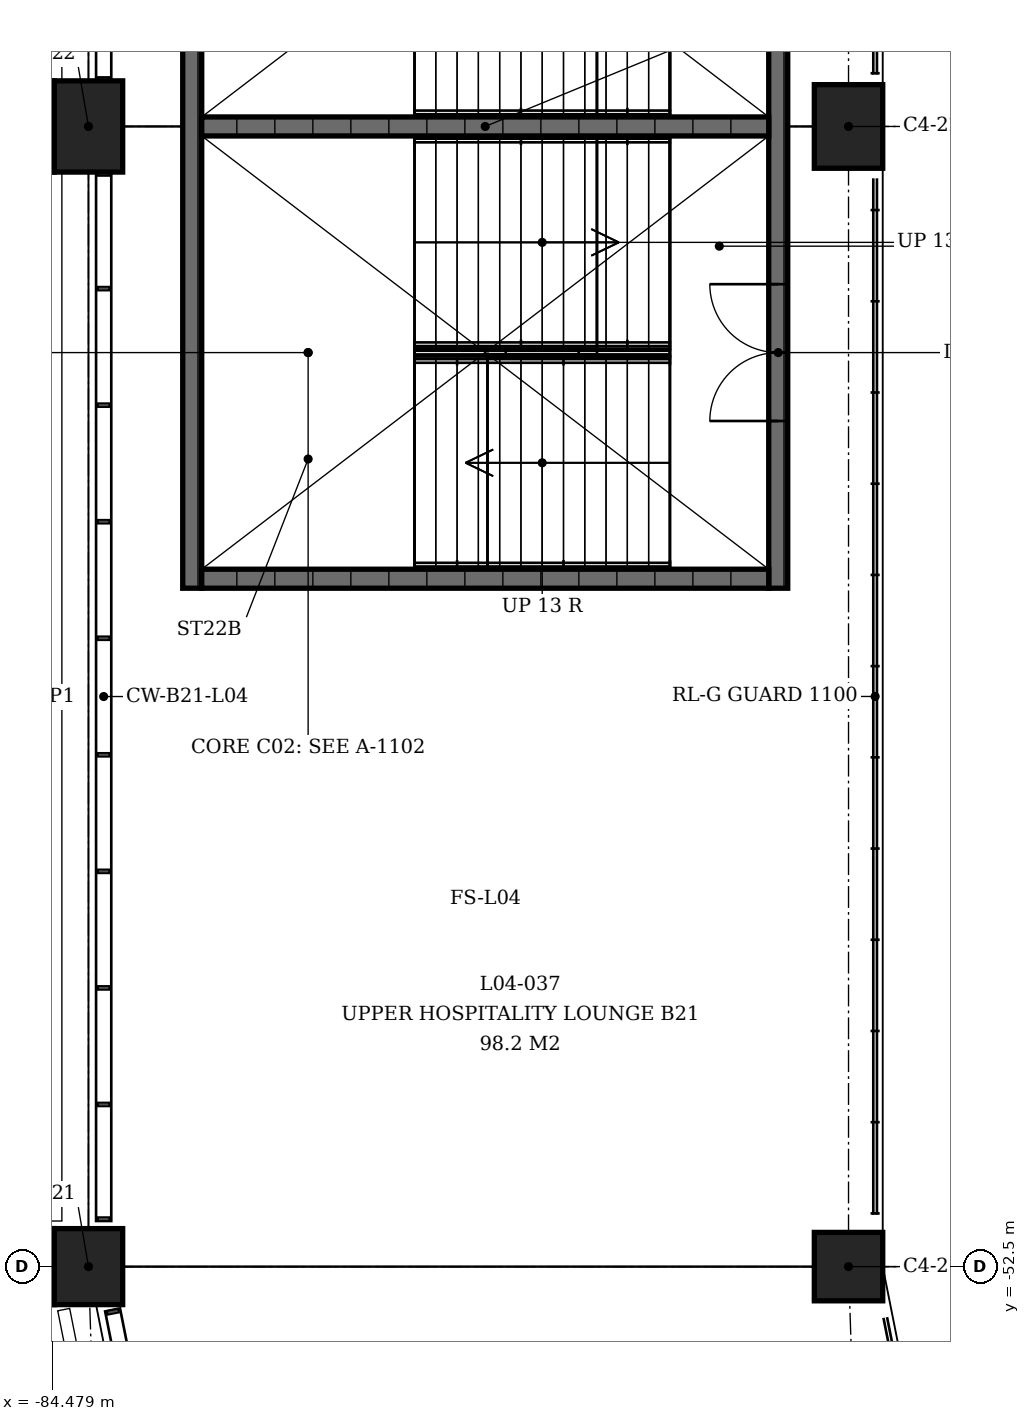
"""IFC4 building model, lengths in metres.
Left out: names, types, materials, properties, quantities, classifications, styles, units other than length and angle.
Written with IfcOpenShell. Run it as: python <this file> out.ifc"""

import sys

from ifc_helpers import new_model, si_unit, direction, frame, frame_2d, origin, origin_2d, place, context, subcontext, project, spatial, rectangle, extrude, element, fill, save


model = new_model("IFC4")
c1 = context("Model", 3, precision=1e-05, world=origin(), true_north=direction((0.0, 1.0)))
c2 = subcontext(c1, "Body", "Model", "MODEL_VIEW")
j1 = project(units=[si_unit("LENGTHUNIT", "METRE"), si_unit("PLANEANGLEUNIT", "RADIAN")], contexts=[c1])
p1 = place(None, origin())
s1 = spatial("IfcSite", under=j1, at=p1, CompositionType="ELEMENT")
p2 = place(p1, origin())
s2 = spatial("IfcBuilding", under=s1, at=p2, CompositionType="ELEMENT")
p3 = place(p2, frame((0.0, 0.0, 18.0)))
s3 = spatial("IfcBuildingStorey", under=s2, at=p3, CompositionType="ELEMENT", Elevation=18.0)
p4 = place(p3, frame((-74.0, -52.5, 0.0), z_axis=(0.0, 0.0, 1.0), x_axis=(0.0, -1.0, 0.0)))
e1 = element("IfcColumn", 1, at=p4, inside=s3, PredefinedType="COLUMN", context=c2, shape_type="SweptSolid", body=[
    extrude(rectangle(XDim=0.9, YDim=0.9, at=origin_2d()), origin(), (0.0, 0.0, 1.0), 4.5),
])
p5 = place(p3, frame((-84.0, -52.5, 0.0), z_axis=(0.0, 0.0, 1.0), x_axis=(0.0, -1.0, 0.0)))
e2 = element("IfcColumn", 2, at=p5, inside=s3, PredefinedType="COLUMN", context=c2, shape_type="SweptSolid", body=[
    extrude(rectangle(XDim=1.0, YDim=0.9, at=origin_2d()), origin(), (0.0, 0.0, 1.0), 4.5),
])
p6 = place(p3, frame((-74.0, -37.5, 0.0), z_axis=(0.0, 0.0, 1.0), x_axis=(0.0, -1.0, 0.0)))
e3 = element("IfcColumn", 3, at=p6, inside=s3, PredefinedType="COLUMN", context=c2, shape_type="SweptSolid", body=[
    extrude(rectangle(XDim=1.1, YDim=0.9, at=origin_2d()), origin(), (0.0, 0.0, 1.0), 4.5),
])
p7 = place(p3, frame((-84.0, -37.5, 0.0), z_axis=(0.0, 0.0, 1.0), x_axis=(0.0, -1.0, 0.0)))
e4 = element("IfcColumn", 4, at=p7, inside=s3, PredefinedType="COLUMN", context=c2, shape_type="SweptSolid", body=[
    extrude(rectangle(XDim=1.2, YDim=0.9, at=origin_2d()), origin(), (0.0, 0.0, 1.0), 4.5),
])
p8 = place(p3, frame((-74.925, -31.425, 0.0), z_axis=(0.0, 0.0, 1.0), x_axis=(0.0, -1.0, 0.0)))
e5 = element("IfcWall", 5, at=p8, inside=s3, PredefinedType="SHEAR", context=c2, shape_type="SweptSolid", body=[
    extrude(rectangle(XDim=12.15, YDim=0.25, at=frame_2d((6.075, 0.0))), origin(), (0.0, 0.0, 1.0), 4.09),
])
p9 = place(p8, frame((2.2, 0.0, 0.0)))
e6 = element("IfcOpeningElement", 6, at=p9, cuts=e5, PredefinedType="OPENING", context=c2, shape_type="SweptSolid", body=[
    extrude(rectangle(XDim=1.8, YDim=2.1, at=frame_2d((0.9, 1.05))), frame((0.0, 0.125, 0.0), z_axis=(0.0, -1.0, 0.0), x_axis=(1.0, 0.0, 0.0)), (0.0, 0.0, 1.0), 0.25),
])
p10 = place(p8, frame((8.15, 0.0, 0.0)))
e7 = element("IfcOpeningElement", 7, at=p10, cuts=e5, PredefinedType="OPENING", context=c2, shape_type="SweptSolid", body=[
    extrude(rectangle(XDim=1.8, YDim=2.1, at=frame_2d((0.9, 1.05))), frame((0.0, 0.125, 0.0), z_axis=(0.0, -1.0, 0.0), x_axis=(1.0, 0.0, 0.0)), (0.0, 0.0, 1.0), 0.25),
])
p11 = place(p3, frame((-82.635, -31.425, 0.0), z_axis=(0.0, 0.0, 1.0), x_axis=(0.0, -1.0, 0.0)))
e8 = element("IfcWall", 8, at=p11, inside=s3, PredefinedType="SHEAR", context=c2, shape_type="SweptSolid", body=[
    extrude(rectangle(XDim=12.15, YDim=0.25, at=frame_2d((6.075, 0.0))), origin(), (0.0, 0.0, 1.0), 4.09),
])
for number, where, z_axis, x_axis in (
    (9, (-75.05, -43.45, 0.0), (0.0, 0.0, 1.0), (-1.0, 0.0, 0.0)),
    (10, (-75.05, -37.5, 0.0), (0.0, 0.0, 1.0), (-1.0, 0.0, 0.0)),
):
    element("IfcWall", number, at=place(p3, frame(where, z_axis=z_axis, x_axis=x_axis)), inside=s3, PredefinedType="SHEAR", context=c2, shape_type="SweptSolid", body=[
        extrude(rectangle(XDim=7.46, YDim=0.25, at=frame_2d((3.73, 0.0))), origin(), (0.0, 0.0, 1.0), 4.09),
    ])
p12 = place(p10, origin())
e11 = element("IfcDoor", 11, at=p12, inside=s3, OperationType="DOUBLE_DOOR_SINGLE_SWING", PredefinedType="DOOR", context=c2, shape_type="SweptSolid", body=[
    extrude(rectangle(XDim=1.8, YDim=2.1, at=frame_2d((0.9, 1.05))), frame((0.0, 0.025, 0.0), z_axis=(0.0, -1.0, 0.0), x_axis=(1.0, 0.0, 0.0)), (0.0, 0.0, 1.0), 0.05),
])
fill(e7, e11)
save(model, sys.argv[1])
